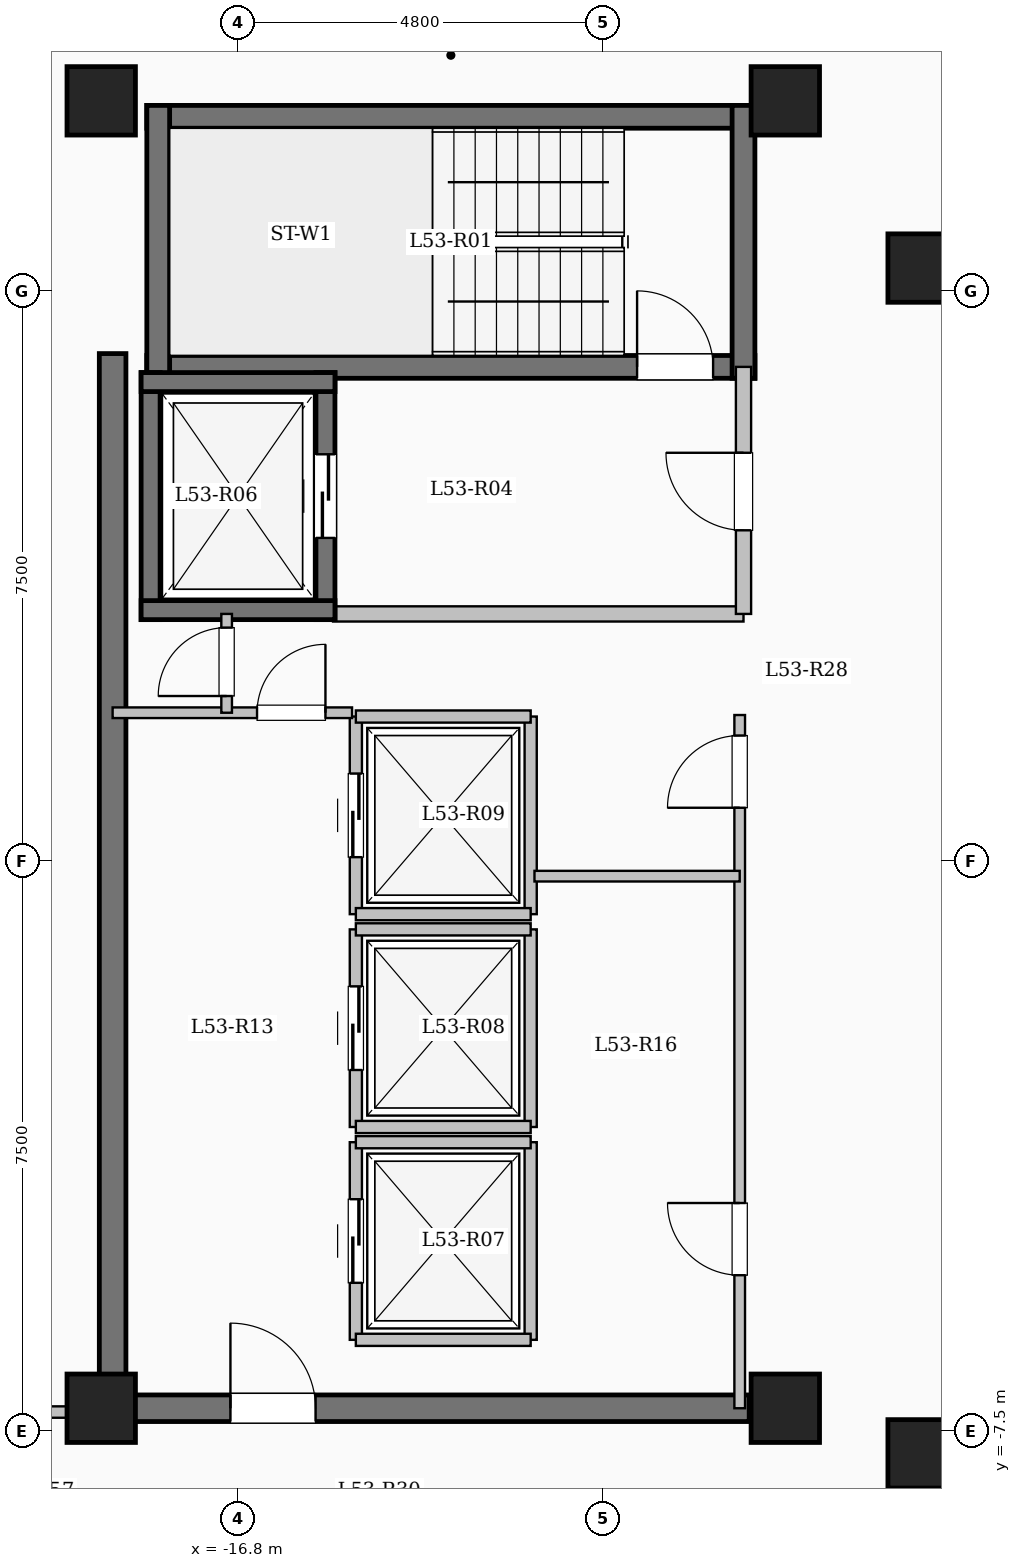
"""IFC4 building model, lengths in metres.
Left out: names, types, materials, properties, quantities, classifications, styles, units other than length and angle.
Written with IfcOpenShell. Run it as: python <this file> out.ifc"""

import sys

from ifc_helpers import new_model, si_unit, direction, frame, frame_2d, origin, origin_2d, place, context, subcontext, project, spatial, rectangle, extrude, element, fill, save


model = new_model("IFC4")
c1 = context("Model", 3, precision=1e-05, world=origin(), true_north=direction((0.0, 1.0)))
c2 = subcontext(c1, "Body", "Model", "MODEL_VIEW")
j1 = project(units=[si_unit("LENGTHUNIT", "METRE"), si_unit("PLANEANGLEUNIT", "RADIAN")], contexts=[c1])
p1 = place(None, origin())
s1 = spatial("IfcSite", under=j1, at=p1, CompositionType="ELEMENT")
p2 = place(p1, origin())
s2 = spatial("IfcBuilding", under=s1, at=p2, CompositionType="ELEMENT")
p3 = place(p2, frame((0.0, 0.0, 196.95)))
s3 = spatial("IfcBuildingStorey", under=s2, at=p3, CompositionType="ELEMENT", Elevation=196.95)
for number, where, z_axis, x_axis in (
    (1, (-7.8, -7.8, 0.0), (0.0, 0.0, 1.0), (1.0, 0.0, 0.0)),
    (2, (-7.8, 7.8, 0.0), (0.0, 0.0, 1.0), (1.0, 0.0, 0.0)),
    (3, (-9.6, -7.2, 0.0), (0.0, 0.0, 1.0), (1.0, 0.0, 0.0)),
    (4, (-9.6, 10.0, 0.0), (0.0, 0.0, 1.0), (1.0, 0.0, 0.0)),
    (5, (-18.6, -7.2, 0.0), (0.0, 0.0, 1.0), (1.0, 0.0, 0.0)),
    (6, (-18.6, 10.0, 0.0), (0.0, 0.0, 1.0), (1.0, 0.0, 0.0)),
):
    element("IfcColumn", number, at=place(p3, frame(where, z_axis=z_axis, x_axis=x_axis)), inside=s3, PredefinedType="COLUMN", context=c2, shape_type="SweptSolid", body=[
        extrude(rectangle(XDim=0.9, YDim=0.9, at=origin_2d()), origin(), (0.0, 0.0, 1.0), 3.35),
    ])
p4 = place(p3, frame((-18.0, 9.79, 0.0), z_axis=(0.0, 0.0, 1.0), x_axis=(1.0, 0.0, 0.0)))
e7 = element("IfcWall", 7, at=p4, inside=s3, PredefinedType="SHEAR", context=c2, shape_type="SweptSolid", body=[
    extrude(rectangle(XDim=8.0, YDim=0.3, at=frame_2d((4.0, 0.0))), origin(), (0.0, 0.0, 1.0), 3.35),
])
p5 = place(p3, frame((-18.0, 6.5, 0.0), z_axis=(0.0, 0.0, 1.0), x_axis=(1.0, 0.0, 0.0)))
e8 = element("IfcWall", 8, at=p5, inside=s3, PredefinedType="SHEAR", context=c2, shape_type="SweptSolid", body=[
    extrude(rectangle(XDim=8.0, YDim=0.3, at=frame_2d((4.0, 0.0))), origin(), (0.0, 0.0, 1.0), 3.35),
])
p6 = place(p5, frame((6.45, 0.0, 0.0)))
e9 = element("IfcOpeningElement", 9, at=p6, cuts=e8, PredefinedType="OPENING", context=c2, shape_type="SweptSolid", body=[
    extrude(rectangle(XDim=1.0, YDim=2.15, at=frame_2d((0.5, 1.075))), frame((0.0, 0.16, 0.0), z_axis=(0.0, -1.0, 0.0), x_axis=(1.0, 0.0, 0.0)), (0.0, 0.0, 1.0), 0.32),
])
for number, where, z_axis, x_axis in (
    (10, (-17.85, 6.35, 0.0), (0.0, 0.0, 1.0), (0.0, 1.0, 0.0)),
    (11, (-10.15, 6.35, 0.0), (0.0, 0.0, 1.0), (0.0, 1.0, 0.0)),
):
    element("IfcWall", number, at=place(p3, frame(where, z_axis=z_axis, x_axis=x_axis)), inside=s3, PredefinedType="SHEAR", context=c2, shape_type="SweptSolid", body=[
        extrude(rectangle(XDim=3.59, YDim=0.3, at=frame_2d((1.795, 0.0))), origin(), (0.0, 0.0, 1.0), 3.35),
    ])
p7 = place(p3, frame((-15.55, 3.25, 0.0), z_axis=(0.0, 0.0, 1.0), x_axis=(1.0, 0.0, 0.0)))
e12 = element("IfcWall", 12, at=p7, inside=s3, PredefinedType="SOLIDWALL", context=c2, shape_type="SweptSolid", body=[
    extrude(rectangle(XDim=5.4, YDim=0.2, at=frame_2d((2.7, 0.0))), origin(), (0.0, 0.0, 1.0), 3.1),
])
p8 = place(p3, frame((-10.15, 3.25, 0.0), z_axis=(0.0, 0.0, 1.0), x_axis=(0.0, 1.0, 0.0)))
e13 = element("IfcWall", 13, at=p8, inside=s3, PredefinedType="SOLIDWALL", context=c2, shape_type="SweptSolid", body=[
    extrude(rectangle(XDim=3.25, YDim=0.2, at=frame_2d((1.625, 0.0))), origin(), (0.0, 0.0, 1.0), 3.1),
])
p9 = place(p8, frame((1.1, 0.0, 0.0)))
e14 = element("IfcOpeningElement", 14, at=p9, cuts=e13, PredefinedType="OPENING", context=c2, shape_type="SweptSolid", body=[
    extrude(rectangle(XDim=1.02, YDim=2.15, at=frame_2d((0.51, 1.075))), frame((0.0, 0.11, 0.0), z_axis=(0.0, -1.0, 0.0), x_axis=(1.0, 0.0, 0.0)), (0.0, 0.0, 1.0), 0.22),
])
p10 = place(p3, frame((-17.95, 3.175, 0.0), z_axis=(0.0, 0.0, 1.0), x_axis=(0.0, 1.0, 0.0)))
e15 = element("IfcWall", 15, at=p10, inside=s3, PredefinedType="SHEAR", context=c2, shape_type="SweptSolid", body=[
    extrude(rectangle(XDim=3.25, YDim=0.25, at=frame_2d((1.625, 0.0))), origin(), (0.0, 0.0, 1.0), 3.35),
])
p11 = place(p3, frame((-15.65, 3.175, 0.0), z_axis=(0.0, 0.0, 1.0), x_axis=(0.0, 1.0, 0.0)))
e16 = element("IfcWall", 16, at=p11, inside=s3, PredefinedType="SHEAR", context=c2, shape_type="SweptSolid", body=[
    extrude(rectangle(XDim=3.25, YDim=0.25, at=frame_2d((1.625, 0.0))), origin(), (0.0, 0.0, 1.0), 3.35),
])
p12 = place(p11, frame((1.075, 0.0, 0.0)))
e17 = element("IfcOpeningElement", 17, at=p12, cuts=e16, PredefinedType="OPENING", context=c2, shape_type="SweptSolid", body=[
    extrude(rectangle(XDim=1.1, YDim=2.15, at=frame_2d((0.55, 1.075))), frame((0.0, 0.135, 0.0), z_axis=(0.0, -1.0, 0.0), x_axis=(1.0, 0.0, 0.0)), (0.0, 0.0, 1.0), 0.27),
])
for number, where, z_axis, x_axis in (
    (18, (-18.075, 3.3, 0.0), (0.0, 0.0, 1.0), (1.0, 0.0, 0.0)),
    (19, (-18.075, 6.3, 0.0), (0.0, 0.0, 1.0), (1.0, 0.0, 0.0)),
):
    element("IfcWall", number, at=place(p3, frame(where, z_axis=z_axis, x_axis=x_axis)), inside=s3, PredefinedType="SHEAR", context=c2, shape_type="SweptSolid", body=[
        extrude(rectangle(XDim=2.55, YDim=0.25, at=frame_2d((1.275, 0.0))), origin(), (0.0, 0.0, 1.0), 3.35),
    ])
p13 = place(p3, frame((-15.25, -6.3, 0.0), z_axis=(0.0, 0.0, 1.0), x_axis=(0.0, 1.0, 0.0)))
e20 = element("IfcWall", 20, at=p13, inside=s3, PredefinedType="SOLIDWALL", context=c2, shape_type="SweptSolid", body=[
    extrude(rectangle(XDim=2.6, YDim=0.16, at=frame_2d((1.3, 0.0))), origin(), (0.0, 0.0, 1.0), 3.1),
])
p14 = place(p13, frame((0.75, 0.0, 0.0)))
e21 = element("IfcOpeningElement", 21, at=p14, cuts=e20, PredefinedType="OPENING", context=c2, shape_type="SweptSolid", body=[
    extrude(rectangle(XDim=1.1, YDim=2.15, at=frame_2d((0.55, 1.075))), frame((0.0, 0.09, 0.0), z_axis=(0.0, -1.0, 0.0), x_axis=(1.0, 0.0, 0.0)), (0.0, 0.0, 1.0), 0.18),
])
p15 = place(p3, frame((-12.95, -6.3, 0.0), z_axis=(0.0, 0.0, 1.0), x_axis=(0.0, 1.0, 0.0)))
e22 = element("IfcWall", 22, at=p15, inside=s3, PredefinedType="SOLIDWALL", context=c2, shape_type="SweptSolid", body=[
    extrude(rectangle(XDim=2.6, YDim=0.16, at=frame_2d((1.3, 0.0))), origin(), (0.0, 0.0, 1.0), 3.1),
])
for number, where, z_axis, x_axis in (
    (23, (-15.25, -6.3, 0.0), (0.0, 0.0, 1.0), (1.0, 0.0, 0.0)),
    (24, (-15.25, -3.7, 0.0), (0.0, 0.0, 1.0), (1.0, 0.0, 0.0)),
):
    element("IfcWall", number, at=place(p3, frame(where, z_axis=z_axis, x_axis=x_axis)), inside=s3, PredefinedType="SOLIDWALL", context=c2, shape_type="SweptSolid", body=[
        extrude(rectangle(XDim=2.3, YDim=0.16, at=frame_2d((1.15, 0.0))), origin(), (0.0, 0.0, 1.0), 3.1),
    ])
p16 = place(p3, frame((-15.25, -3.5, 0.0), z_axis=(0.0, 0.0, 1.0), x_axis=(0.0, 1.0, 0.0)))
e25 = element("IfcWall", 25, at=p16, inside=s3, PredefinedType="SOLIDWALL", context=c2, shape_type="SweptSolid", body=[
    extrude(rectangle(XDim=2.6, YDim=0.16, at=frame_2d((1.3, 0.0))), origin(), (0.0, 0.0, 1.0), 3.1),
])
p17 = place(p16, frame((0.75, 0.0, 0.0)))
e26 = element("IfcOpeningElement", 26, at=p17, cuts=e25, PredefinedType="OPENING", context=c2, shape_type="SweptSolid", body=[
    extrude(rectangle(XDim=1.1, YDim=2.15, at=frame_2d((0.55, 1.075))), frame((0.0, 0.09, 0.0), z_axis=(0.0, -1.0, 0.0), x_axis=(1.0, 0.0, 0.0)), (0.0, 0.0, 1.0), 0.18),
])
p18 = place(p3, frame((-12.95, -3.5, 0.0), z_axis=(0.0, 0.0, 1.0), x_axis=(0.0, 1.0, 0.0)))
e27 = element("IfcWall", 27, at=p18, inside=s3, PredefinedType="SOLIDWALL", context=c2, shape_type="SweptSolid", body=[
    extrude(rectangle(XDim=2.6, YDim=0.16, at=frame_2d((1.3, 0.0))), origin(), (0.0, 0.0, 1.0), 3.1),
])
for number, where, z_axis, x_axis in (
    (28, (-15.25, -3.5, 0.0), (0.0, 0.0, 1.0), (1.0, 0.0, 0.0)),
    (29, (-15.25, -0.9, 0.0), (0.0, 0.0, 1.0), (1.0, 0.0, 0.0)),
):
    element("IfcWall", number, at=place(p3, frame(where, z_axis=z_axis, x_axis=x_axis)), inside=s3, PredefinedType="SOLIDWALL", context=c2, shape_type="SweptSolid", body=[
        extrude(rectangle(XDim=2.3, YDim=0.16, at=frame_2d((1.15, 0.0))), origin(), (0.0, 0.0, 1.0), 3.1),
    ])
p19 = place(p3, frame((-15.25, -0.7, 0.0), z_axis=(0.0, 0.0, 1.0), x_axis=(0.0, 1.0, 0.0)))
e30 = element("IfcWall", 30, at=p19, inside=s3, PredefinedType="SOLIDWALL", context=c2, shape_type="SweptSolid", body=[
    extrude(rectangle(XDim=2.6, YDim=0.16, at=frame_2d((1.3, 0.0))), origin(), (0.0, 0.0, 1.0), 3.1),
])
p20 = place(p19, frame((0.75, 0.0, 0.0)))
e31 = element("IfcOpeningElement", 31, at=p20, cuts=e30, PredefinedType="OPENING", context=c2, shape_type="SweptSolid", body=[
    extrude(rectangle(XDim=1.1, YDim=2.15, at=frame_2d((0.55, 1.075))), frame((0.0, 0.09, 0.0), z_axis=(0.0, -1.0, 0.0), x_axis=(1.0, 0.0, 0.0)), (0.0, 0.0, 1.0), 0.18),
])
p21 = place(p3, frame((-12.95, -0.7, 0.0), z_axis=(0.0, 0.0, 1.0), x_axis=(0.0, 1.0, 0.0)))
e32 = element("IfcWall", 32, at=p21, inside=s3, PredefinedType="SOLIDWALL", context=c2, shape_type="SweptSolid", body=[
    extrude(rectangle(XDim=2.6, YDim=0.16, at=frame_2d((1.3, 0.0))), origin(), (0.0, 0.0, 1.0), 3.1),
])
for number, where, z_axis, x_axis in (
    (33, (-15.25, -0.7, 0.0), (0.0, 0.0, 1.0), (1.0, 0.0, 0.0)),
    (34, (-15.25, 1.9, 0.0), (0.0, 0.0, 1.0), (1.0, 0.0, 0.0)),
):
    element("IfcWall", number, at=place(p3, frame(where, z_axis=z_axis, x_axis=x_axis)), inside=s3, PredefinedType="SOLIDWALL", context=c2, shape_type="SweptSolid", body=[
        extrude(rectangle(XDim=2.3, YDim=0.16, at=frame_2d((1.15, 0.0))), origin(), (0.0, 0.0, 1.0), 3.1),
    ])
p22 = place(p3, frame((-18.45, -7.375, 0.0), z_axis=(0.0, 0.0, 1.0), x_axis=(0.0, 1.0, 0.0)))
e35 = element("IfcWall", 35, at=p22, inside=s3, PredefinedType="SHEAR", context=c2, shape_type="SweptSolid", body=[
    extrude(rectangle(XDim=14.05, YDim=0.35, at=frame_2d((7.025, 0.0))), origin(), (0.0, 0.0, 1.0), 3.35),
])
p23 = place(p3, frame((-18.625, -7.2, 0.0), z_axis=(0.0, 0.0, 1.0), x_axis=(1.0, 0.0, 0.0)))
e36 = element("IfcWall", 36, at=p23, inside=s3, PredefinedType="SHEAR", context=c2, shape_type="SweptSolid", body=[
    extrude(rectangle(XDim=8.55, YDim=0.35, at=frame_2d((4.275, 0.0))), origin(), (0.0, 0.0, 1.0), 3.35),
])
p24 = place(p23, frame((1.725, 0.0, 0.0)))
e37 = element("IfcOpeningElement", 37, at=p24, cuts=e36, PredefinedType="OPENING", context=c2, shape_type="SweptSolid", body=[
    extrude(rectangle(XDim=1.12, YDim=2.15, at=frame_2d((0.56, 1.075))), frame((0.0, 0.185, 0.0), z_axis=(0.0, -1.0, 0.0), x_axis=(1.0, 0.0, 0.0)), (0.0, 0.0, 1.0), 0.37),
])
p25 = place(p3, frame((-18.45, 1.95, 0.0), z_axis=(0.0, 0.0, 1.0), x_axis=(1.0, 0.0, 0.0)))
e38 = element("IfcWall", 38, at=p25, inside=s3, PredefinedType="PARTITIONING", context=c2, shape_type="SweptSolid", body=[
    extrude(rectangle(XDim=3.15, YDim=0.14, at=frame_2d((1.575, 0.0))), origin(), (0.0, 0.0, 1.0), 3.1),
])
p26 = place(p25, frame((1.9, 0.0, 0.0)))
e39 = element("IfcOpeningElement", 39, at=p26, cuts=e38, PredefinedType="OPENING", context=c2, shape_type="SweptSolid", body=[
    extrude(rectangle(XDim=0.9, YDim=2.08, at=frame_2d((0.45, 1.04))), frame((0.0, 0.08, 0.0), z_axis=(0.0, -1.0, 0.0), x_axis=(1.0, 0.0, 0.0)), (0.0, 0.0, 1.0), 0.16),
])
p27 = place(p3, frame((-16.95, 1.95, 0.0), z_axis=(0.0, 0.0, 1.0), x_axis=(0.0, 1.0, 0.0)))
e40 = element("IfcWall", 40, at=p27, inside=s3, PredefinedType="PARTITIONING", context=c2, shape_type="SweptSolid", body=[
    extrude(rectangle(XDim=1.3, YDim=0.14, at=frame_2d((0.65, 0.0))), origin(), (0.0, 0.0, 1.0), 3.1),
])
p28 = place(p27, frame((0.22, 0.0, 0.0)))
e41 = element("IfcOpeningElement", 41, at=p28, cuts=e40, PredefinedType="OPENING", context=c2, shape_type="SweptSolid", body=[
    extrude(rectangle(XDim=0.9, YDim=2.08, at=frame_2d((0.45, 1.04))), frame((0.0, 0.08, 0.0), z_axis=(0.0, -1.0, 0.0), x_axis=(1.0, 0.0, 0.0)), (0.0, 0.0, 1.0), 0.16),
])
p29 = place(p3, frame((-10.2, -7.2, 0.0), z_axis=(0.0, 0.0, 1.0), x_axis=(0.0, 1.0, 0.0)))
e42 = element("IfcWall", 42, at=p29, inside=s3, PredefinedType="PARTITIONING", context=c2, shape_type="SweptSolid", body=[
    extrude(rectangle(XDim=9.12, YDim=0.14, at=frame_2d((4.56, 0.0))), origin(), (0.0, 0.0, 1.0), 3.1),
])
p30 = place(p29, frame((1.75, 0.0, 0.0)))
e43 = element("IfcOpeningElement", 43, at=p30, cuts=e42, PredefinedType="OPENING", context=c2, shape_type="SweptSolid", body=[
    extrude(rectangle(XDim=0.95, YDim=2.12, at=frame_2d((0.475, 1.06))), frame((0.0, 0.08, 0.0), z_axis=(0.0, -1.0, 0.0), x_axis=(1.0, 0.0, 0.0)), (0.0, 0.0, 1.0), 0.16),
])
p31 = place(p29, frame((7.9, 0.0, 0.0)))
e44 = element("IfcOpeningElement", 44, at=p31, cuts=e42, PredefinedType="OPENING", context=c2, shape_type="SweptSolid", body=[
    extrude(rectangle(XDim=0.95, YDim=2.12, at=frame_2d((0.475, 1.06))), frame((0.0, 0.08, 0.0), z_axis=(0.0, -1.0, 0.0), x_axis=(1.0, 0.0, 0.0)), (0.0, 0.0, 1.0), 0.16),
])
p32 = place(p3, frame((-12.9, -0.2, 0.0), z_axis=(0.0, 0.0, 1.0), x_axis=(1.0, 0.0, 0.0)))
e45 = element("IfcWall", 45, at=p32, inside=s3, PredefinedType="PARTITIONING", context=c2, shape_type="SweptSolid", body=[
    extrude(rectangle(XDim=2.7, YDim=0.14, at=frame_2d((1.35, 0.0))), origin(), (0.0, 0.0, 1.0), 3.1),
])
p33 = place(p3, frame((-23.58, -7.25, 0.0), z_axis=(0.0, 0.0, 1.0), x_axis=(1.0, 0.0, 0.0)))
e46 = element("IfcWall", 46, at=p33, inside=s3, PredefinedType="PARTITIONING", context=c2, shape_type="SweptSolid", body=[
    extrude(rectangle(XDim=5.13, YDim=0.15, at=frame_2d((2.565, 0.0))), origin(), (0.0, 0.0, 1.0), 3.1),
])
p34 = place(p33, frame((2.08, 0.0, 0.0)))
e47 = element("IfcOpeningElement", 47, at=p34, cuts=e46, PredefinedType="OPENING", context=c2, shape_type="SweptSolid", body=[
    extrude(rectangle(XDim=1.08, YDim=2.15, at=frame_2d((0.54, 1.075))), frame((0.0, 0.085, 0.0), z_axis=(0.0, -1.0, 0.0), x_axis=(1.0, 0.0, 0.0)), (0.0, 0.0, 1.0), 0.17),
])
p35 = place(p6, origin())
e48 = element("IfcDoor", 48, at=p35, inside=s3, OperationType="SINGLE_SWING_LEFT", PredefinedType="DOOR", context=c2, shape_type="SweptSolid", body=[
    extrude(rectangle(XDim=1.0, YDim=2.15, at=frame_2d((0.5, 1.075))), frame((0.0, 0.025, 0.0), z_axis=(0.0, -1.0, 0.0), x_axis=(1.0, 0.0, 0.0)), (0.0, 0.0, 1.0), 0.05),
])
fill(e9, e48)
p36 = place(p9, origin())
e49 = element("IfcDoor", 49, at=p36, inside=s3, OperationType="SINGLE_SWING_RIGHT", PredefinedType="DOOR", context=c2, shape_type="SweptSolid", body=[
    extrude(rectangle(XDim=1.02, YDim=2.15, at=frame_2d((0.51, 1.075))), frame((0.0, 0.025, 0.0), z_axis=(0.0, -1.0, 0.0), x_axis=(1.0, 0.0, 0.0)), (0.0, 0.0, 1.0), 0.05),
])
fill(e14, e49)
p37 = place(p12, origin())
e50 = element("IfcDoor", 50, at=p37, inside=s3, OperationType="SLIDING_TO_LEFT", PredefinedType="DOOR", context=c2, shape_type="SweptSolid", body=[
    extrude(rectangle(XDim=1.1, YDim=2.15, at=frame_2d((0.55, 1.075))), frame((0.0, 0.025, 0.0), z_axis=(0.0, -1.0, 0.0), x_axis=(1.0, 0.0, 0.0)), (0.0, 0.0, 1.0), 0.05),
])
fill(e17, e50)
p38 = place(p14, origin())
e51 = element("IfcDoor", 51, at=p38, inside=s3, OperationType="SLIDING_TO_LEFT", PredefinedType="DOOR", context=c2, shape_type="SweptSolid", body=[
    extrude(rectangle(XDim=1.1, YDim=2.15, at=frame_2d((0.55, 1.075))), frame((0.0, 0.025, 0.0), z_axis=(0.0, -1.0, 0.0), x_axis=(1.0, 0.0, 0.0)), (0.0, 0.0, 1.0), 0.05),
])
fill(e21, e51)
p39 = place(p17, origin())
e52 = element("IfcDoor", 52, at=p39, inside=s3, OperationType="SLIDING_TO_LEFT", PredefinedType="DOOR", context=c2, shape_type="SweptSolid", body=[
    extrude(rectangle(XDim=1.1, YDim=2.15, at=frame_2d((0.55, 1.075))), frame((0.0, 0.025, 0.0), z_axis=(0.0, -1.0, 0.0), x_axis=(1.0, 0.0, 0.0)), (0.0, 0.0, 1.0), 0.05),
])
fill(e26, e52)
p40 = place(p20, origin())
e53 = element("IfcDoor", 53, at=p40, inside=s3, OperationType="SLIDING_TO_LEFT", PredefinedType="DOOR", context=c2, shape_type="SweptSolid", body=[
    extrude(rectangle(XDim=1.1, YDim=2.15, at=frame_2d((0.55, 1.075))), frame((0.0, 0.025, 0.0), z_axis=(0.0, -1.0, 0.0), x_axis=(1.0, 0.0, 0.0)), (0.0, 0.0, 1.0), 0.05),
])
fill(e31, e53)
p41 = place(p24, origin())
e54 = element("IfcDoor", 54, at=p41, inside=s3, OperationType="SINGLE_SWING_LEFT", PredefinedType="DOOR", context=c2, shape_type="SweptSolid", body=[
    extrude(rectangle(XDim=1.12, YDim=2.15, at=frame_2d((0.56, 1.075))), frame((0.0, 0.025, 0.0), z_axis=(0.0, -1.0, 0.0), x_axis=(1.0, 0.0, 0.0)), (0.0, 0.0, 1.0), 0.05),
])
fill(e37, e54)
p42 = place(p26, origin())
e55 = element("IfcDoor", 55, at=p42, inside=s3, OperationType="SINGLE_SWING_RIGHT", PredefinedType="DOOR", context=c2, shape_type="SweptSolid", body=[
    extrude(rectangle(XDim=0.9, YDim=2.08, at=frame_2d((0.45, 1.04))), frame((0.0, 0.025, 0.0), z_axis=(0.0, -1.0, 0.0), x_axis=(1.0, 0.0, 0.0)), (0.0, 0.0, 1.0), 0.05),
])
fill(e39, e55)
p43 = place(p28, origin())
e56 = element("IfcDoor", 56, at=p43, inside=s3, OperationType="SINGLE_SWING_LEFT", PredefinedType="DOOR", context=c2, shape_type="SweptSolid", body=[
    extrude(rectangle(XDim=0.9, YDim=2.08, at=frame_2d((0.45, 1.04))), frame((0.0, 0.025, 0.0), z_axis=(0.0, -1.0, 0.0), x_axis=(1.0, 0.0, 0.0)), (0.0, 0.0, 1.0), 0.05),
])
fill(e41, e56)
p44 = place(p30, origin())
e57 = element("IfcDoor", 57, at=p44, inside=s3, OperationType="SINGLE_SWING_RIGHT", PredefinedType="DOOR", context=c2, shape_type="SweptSolid", body=[
    extrude(rectangle(XDim=0.95, YDim=2.12, at=frame_2d((0.475, 1.06))), frame((0.0, 0.025, 0.0), z_axis=(0.0, -1.0, 0.0), x_axis=(1.0, 0.0, 0.0)), (0.0, 0.0, 1.0), 0.05),
])
fill(e43, e57)
p45 = place(p31, origin())
e58 = element("IfcDoor", 58, at=p45, inside=s3, OperationType="SINGLE_SWING_LEFT", PredefinedType="DOOR", context=c2, shape_type="SweptSolid", body=[
    extrude(rectangle(XDim=0.95, YDim=2.12, at=frame_2d((0.475, 1.06))), frame((0.0, 0.025, 0.0), z_axis=(0.0, -1.0, 0.0), x_axis=(1.0, 0.0, 0.0)), (0.0, 0.0, 1.0), 0.05),
])
fill(e44, e58)
save(model, sys.argv[1])
